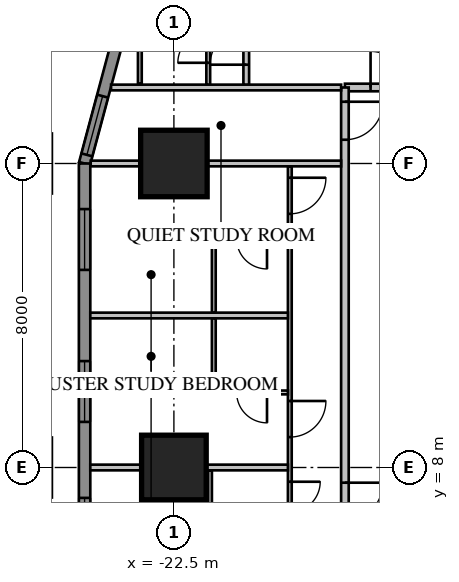
"""IFC4 building model, lengths in metres.
Left out: names, types, materials, properties, quantities, classifications, styles, units other than length and angle.
Written with IfcOpenShell. Run it as: python <this file> out.ifc"""

import sys

from ifc_helpers import new_model, si_unit, direction, frame, frame_2d, origin, origin_2d, place, context, subcontext, project, spatial, rectangle, extrude, element, fill, save


model = new_model("IFC4")
c1 = context("Model", 3, precision=1e-05, world=origin(), true_north=direction((0.0, 1.0)))
c2 = subcontext(c1, "Body", "Model", "MODEL_VIEW")
j1 = project(units=[si_unit("LENGTHUNIT", "METRE"), si_unit("PLANEANGLEUNIT", "RADIAN")], contexts=[c1])
p1 = place(None, origin())
s1 = spatial("IfcSite", under=j1, at=p1, CompositionType="ELEMENT")
p2 = place(p1, origin())
s2 = spatial("IfcBuilding", under=s1, at=p2, CompositionType="ELEMENT")
p3 = place(p2, frame((0.0, 0.0, 39.1)))
s3 = spatial("IfcBuildingStorey", under=s2, at=p3, CompositionType="ELEMENT", Elevation=39.1)
p4 = place(p3, frame((-22.5, 16.0, 0.0), z_axis=(0.0, 0.0, 1.0), x_axis=(1.0, 0.0, 0.0)))
e1 = element("IfcColumn", 1, at=p4, inside=s3, PredefinedType="COLUMN", context=c2, shape_type="SweptSolid", body=[
    extrude(rectangle(XDim=1.75, YDim=1.75, at=origin_2d()), origin(), (0.0, 0.0, 1.0), 3.85),
])
p5 = place(p3, frame((-22.5, 8.0, 0.0), z_axis=(0.0, 0.0, 1.0), x_axis=(1.0, 0.0, 0.0)))
e2 = element("IfcColumn", 2, at=p5, inside=s3, PredefinedType="COLUMN", context=c2, shape_type="SweptSolid", body=[
    extrude(rectangle(XDim=1.7, YDim=1.7, at=origin_2d()), origin(), (0.0, 0.0, 1.0), 3.85),
])
p6 = place(p3, frame((-23.664, 20.425, 0.0), z_axis=(0.0, 0.0, 1.0), x_axis=(-0.258839972501, -0.965920218567, 0.0)))
e3 = element("IfcWall", 3, at=p6, inside=s3, PredefinedType="SOLIDWALL", context=c2, shape_type="SweptSolid", body=[
    extrude(rectangle(XDim=4.581, YDim=0.3, at=frame_2d((2.291, 0.0))), origin(), (0.0, 0.0, 1.0), 3.65),
])
p7 = place(p6, frame((2.746, 0.0, 0.75)))
e4 = element("IfcOpeningElement", 4, at=p7, cuts=e3, PredefinedType="OPENING", context=c2, shape_type="SweptSolid", body=[
    extrude(rectangle(XDim=1.6, YDim=1.8, at=frame_2d((0.8, 0.9))), frame((0.0, 0.17, 0.0), z_axis=(0.0, -1.0, 0.0), x_axis=(1.0, 0.0, 0.0)), (0.0, 0.0, 1.0), 0.34),
])
p8 = place(p3, frame((-24.85, 16.0, 0.0), z_axis=(0.0, 0.0, 1.0), x_axis=(0.0, -1.0, 0.0)))
e5 = element("IfcWall", 5, at=p8, inside=s3, PredefinedType="SOLIDWALL", context=c2, shape_type="SweptSolid", body=[
    extrude(rectangle(XDim=32.0, YDim=0.3, at=frame_2d((16.0, 0.0))), origin(), (0.0, 0.0, 1.0), 3.65),
])
p9 = place(p8, frame((1.2, 0.0, 0.75)))
e6 = element("IfcOpeningElement", 6, at=p9, cuts=e5, PredefinedType="OPENING", context=c2, shape_type="SweptSolid", body=[
    extrude(rectangle(XDim=1.6, YDim=1.8, at=frame_2d((0.8, 0.9))), frame((0.0, 0.17, 0.0), z_axis=(0.0, -1.0, 0.0), x_axis=(1.0, 0.0, 0.0)), (0.0, 0.0, 1.0), 0.34),
])
p10 = place(p8, frame((5.2, 0.0, 0.75)))
e7 = element("IfcOpeningElement", 7, at=p10, cuts=e5, PredefinedType="OPENING", context=c2, shape_type="SweptSolid", body=[
    extrude(rectangle(XDim=1.6, YDim=1.8, at=frame_2d((0.8, 0.9))), frame((0.0, 0.17, 0.0), z_axis=(0.0, -1.0, 0.0), x_axis=(1.0, 0.0, 0.0)), (0.0, 0.0, 1.0), 0.34),
])
p11 = place(p8, frame((17.2, 0.0, 0.75)))
e8 = element("IfcOpeningElement", 8, at=p11, cuts=e5, PredefinedType="OPENING", context=c2, shape_type="SweptSolid", body=[
    extrude(rectangle(XDim=1.6, YDim=1.8, at=frame_2d((0.8, 0.9))), frame((0.0, 0.17, 0.0), z_axis=(0.0, -1.0, 0.0), x_axis=(1.0, 0.0, 0.0)), (0.0, 0.0, 1.0), 0.34),
])
p12 = place(p8, frame((21.2, 0.0, 0.75)))
e9 = element("IfcOpeningElement", 9, at=p12, cuts=e5, PredefinedType="OPENING", context=c2, shape_type="SweptSolid", body=[
    extrude(rectangle(XDim=1.6, YDim=1.8, at=frame_2d((0.8, 0.9))), frame((0.0, 0.17, 0.0), z_axis=(0.0, -1.0, 0.0), x_axis=(1.0, 0.0, 0.0)), (0.0, 0.0, 1.0), 0.34),
])
p13 = place(p8, frame((25.2, 0.0, 0.75)))
e10 = element("IfcOpeningElement", 10, at=p13, cuts=e5, PredefinedType="OPENING", context=c2, shape_type="SweptSolid", body=[
    extrude(rectangle(XDim=1.6, YDim=1.8, at=frame_2d((0.8, 0.9))), frame((0.0, 0.17, 0.0), z_axis=(0.0, -1.0, 0.0), x_axis=(1.0, 0.0, 0.0)), (0.0, 0.0, 1.0), 0.34),
])
p14 = place(p8, frame((29.2, 0.0, 0.75)))
e11 = element("IfcOpeningElement", 11, at=p14, cuts=e5, PredefinedType="OPENING", context=c2, shape_type="SweptSolid", body=[
    extrude(rectangle(XDim=1.6, YDim=1.8, at=frame_2d((0.8, 0.9))), frame((0.0, 0.17, 0.0), z_axis=(0.0, -1.0, 0.0), x_axis=(1.0, 0.0, 0.0)), (0.0, 0.0, 1.0), 0.34),
])
p15 = place(p8, frame((8.8, 0.0, 0.75)))
e12 = element("IfcOpeningElement", 12, at=p15, cuts=e5, PredefinedType="OPENING", context=c2, shape_type="SweptSolid", body=[
    extrude(rectangle(XDim=2.4, YDim=1.8, at=frame_2d((1.2, 0.9))), frame((0.0, 0.17, 0.0), z_axis=(0.0, -1.0, 0.0), x_axis=(1.0, 0.0, 0.0)), (0.0, 0.0, 1.0), 0.34),
])
p16 = place(p8, frame((13.812, 0.0, 0.0)))
e13 = element("IfcOpeningElement", 13, at=p16, cuts=e5, PredefinedType="OPENING", context=c2, shape_type="SweptSolid", body=[
    extrude(rectangle(XDim=1.0, YDim=2.4, at=frame_2d((0.5, 1.2))), frame((0.0, 0.17, 0.0), z_axis=(0.0, -1.0, 0.0), x_axis=(1.0, 0.0, 0.0)), (0.0, 0.0, 1.0), 0.34),
])
p17 = place(p3, frame((18.0, 18.0, 0.0), z_axis=(0.0, 0.0, 1.0), x_axis=(-1.0, 0.0, 0.0)))
e14 = element("IfcWall", 14, at=p17, inside=s3, PredefinedType="PARTITIONING", context=c2, shape_type="SweptSolid", body=[
    extrude(rectangle(XDim=36.0, YDim=0.2, at=frame_2d((18.0, 0.0))), origin(), (0.0, 0.0, 1.0), 3.65),
])
p18 = place(p17, frame((10.4, 0.0, 0.0)))
e15 = element("IfcOpeningElement", 15, at=p18, cuts=e14, PredefinedType="OPENING", context=c2, shape_type="SweptSolid", body=[
    extrude(rectangle(XDim=1.0, YDim=2.1, at=frame_2d((0.5, 1.05))), frame((0.0, 0.12, 0.0), z_axis=(0.0, -1.0, 0.0), x_axis=(1.0, 0.0, 0.0)), (0.0, 0.0, 1.0), 0.24),
])
p19 = place(p17, frame((0.375, 0.0, 0.0)))
e16 = element("IfcOpeningElement", 16, at=p19, cuts=e14, PredefinedType="OPENING", context=c2, shape_type="SweptSolid", body=[
    extrude(rectangle(XDim=1.0, YDim=2.1, at=frame_2d((0.5, 1.05))), frame((0.0, 0.12, 0.0), z_axis=(0.0, -1.0, 0.0), x_axis=(1.0, 0.0, 0.0)), (0.0, 0.0, 1.0), 0.24),
])
p20 = place(p17, frame((34.375, 0.0, 0.0)))
e17 = element("IfcOpeningElement", 17, at=p20, cuts=e14, PredefinedType="OPENING", context=c2, shape_type="SweptSolid", body=[
    extrude(rectangle(XDim=0.95, YDim=2.1, at=frame_2d((0.475, 1.05))), frame((0.0, 0.12, 0.0), z_axis=(0.0, -1.0, 0.0), x_axis=(1.0, 0.0, 0.0)), (0.0, 0.0, 1.0), 0.24),
])
p21 = place(p3, frame((-21.596, 18.065, 0.0), z_axis=(0.0, 0.0, 1.0), x_axis=(0.0, 1.0, 0.0)))
e18 = element("IfcWall", 18, at=p21, inside=s3, PredefinedType="PARTITIONING", context=c2, shape_type="SweptSolid", body=[
    extrude(rectangle(XDim=2.335, YDim=0.1, at=frame_2d((1.167, 0.0))), origin(), (0.0, 0.0, 1.0), 3.65),
])
p22 = place(p21, frame((0.585, 0.0, 0.0)))
e19 = element("IfcOpeningElement", 19, at=p22, cuts=e18, PredefinedType="OPENING", context=c2, shape_type="SweptSolid", body=[
    extrude(rectangle(XDim=0.8, YDim=2.1, at=frame_2d((0.4, 1.05))), frame((0.0, 0.07, 0.0), z_axis=(0.0, -1.0, 0.0), x_axis=(1.0, 0.0, 0.0)), (0.0, 0.0, 1.0), 0.14),
])
p23 = place(p3, frame((-23.396, 18.1, 0.0), z_axis=(0.0, 0.0, 1.0), x_axis=(0.0, 1.0, 0.0)))
e20 = element("IfcWall", 20, at=p23, inside=s3, PredefinedType="PARTITIONING", context=c2, shape_type="SweptSolid", body=[
    extrude(rectangle(XDim=2.3, YDim=0.1, at=frame_2d((1.15, 0.0))), origin(), (0.0, 0.0, 1.0), 3.65),
])
p24 = place(p3, frame((-20.596, 18.065, 0.0), z_axis=(0.0, 0.0, 1.0), x_axis=(0.0, 1.0, 0.0)))
e21 = element("IfcWall", 21, at=p24, inside=s3, PredefinedType="PARTITIONING", context=c2, shape_type="SweptSolid", body=[
    extrude(rectangle(XDim=5.209, YDim=0.15, at=frame_2d((2.604, 0.0))), origin(), (0.0, 0.0, 1.0), 3.65),
])
p25 = place(p24, frame((0.535, 0.0, 0.0)))
e22 = element("IfcOpeningElement", 22, at=p25, cuts=e21, PredefinedType="OPENING", context=c2, shape_type="SweptSolid", body=[
    extrude(rectangle(XDim=0.95, YDim=2.1, at=frame_2d((0.475, 1.05))), frame((0.0, 0.095, 0.0), z_axis=(0.0, -1.0, 0.0), x_axis=(1.0, 0.0, 0.0)), (0.0, 0.0, 1.0), 0.19),
])
p26 = place(p3, frame((-18.0, 18.0, 0.0), z_axis=(0.0, 0.0, 1.0), x_axis=(0.0, -1.0, 0.0)))
e23 = element("IfcWall", 23, at=p26, inside=s3, PredefinedType="PARTITIONING", context=c2, shape_type="SweptSolid", body=[
    extrude(rectangle(XDim=36.0, YDim=0.2, at=frame_2d((18.0, 0.0))), origin(), (0.0, 0.0, 1.0), 3.65),
])
p27 = place(p26, frame((10.4, 0.0, 0.0)))
e24 = element("IfcOpeningElement", 24, at=p27, cuts=e23, PredefinedType="OPENING", context=c2, shape_type="SweptSolid", body=[
    extrude(rectangle(XDim=1.0, YDim=2.1, at=frame_2d((0.5, 1.05))), frame((0.0, 0.12, 0.0), z_axis=(0.0, -1.0, 0.0), x_axis=(1.0, 0.0, 0.0)), (0.0, 0.0, 1.0), 0.24),
])
p28 = place(p26, frame((0.375, 0.0, 0.0)))
e25 = element("IfcOpeningElement", 25, at=p28, cuts=e23, PredefinedType="OPENING", context=c2, shape_type="SweptSolid", body=[
    extrude(rectangle(XDim=1.0, YDim=2.1, at=frame_2d((0.5, 1.05))), frame((0.0, 0.12, 0.0), z_axis=(0.0, -1.0, 0.0), x_axis=(1.0, 0.0, 0.0)), (0.0, 0.0, 1.0), 0.24),
])
p29 = place(p26, frame((34.375, 0.0, 0.0)))
e26 = element("IfcOpeningElement", 26, at=p29, cuts=e23, PredefinedType="OPENING", context=c2, shape_type="SweptSolid", body=[
    extrude(rectangle(XDim=0.95, YDim=2.1, at=frame_2d((0.475, 1.05))), frame((0.0, 0.12, 0.0), z_axis=(0.0, -1.0, 0.0), x_axis=(1.0, 0.0, 0.0)), (0.0, 0.0, 1.0), 0.24),
])
p30 = place(p3, frame((-19.45, 15.925, 0.0), z_axis=(0.0, 0.0, 1.0), x_axis=(0.0, -1.0, 0.0)))
e27 = element("IfcWall", 27, at=p30, inside=s3, PredefinedType="PARTITIONING", context=c2, shape_type="SweptSolid", body=[
    extrude(rectangle(XDim=31.85, YDim=0.1, at=frame_2d((15.925, 0.0))), origin(), (0.0, 0.0, 1.0), 3.65),
])
p31 = place(p30, frame((10.125, 0.0, 0.0)))
e28 = element("IfcOpeningElement", 28, at=p31, cuts=e27, PredefinedType="OPENING", context=c2, shape_type="SweptSolid", body=[
    extrude(rectangle(XDim=1.0, YDim=2.1, at=frame_2d((0.5, 1.05))), frame((0.0, 0.07, 0.0), z_axis=(0.0, -1.0, 0.0), x_axis=(1.0, 0.0, 0.0)), (0.0, 0.0, 1.0), 0.14),
])
p32 = place(p30, frame((8.3, 0.0, 0.0)))
e29 = element("IfcOpeningElement", 29, at=p32, cuts=e27, PredefinedType="OPENING", context=c2, shape_type="SweptSolid", body=[
    extrude(rectangle(XDim=0.8, YDim=2.1, at=frame_2d((0.4, 1.05))), frame((0.0, 0.07, 0.0), z_axis=(0.0, -1.0, 0.0), x_axis=(1.0, 0.0, 0.0)), (0.0, 0.0, 1.0), 0.14),
])
p33 = place(p30, frame((0.3, 0.0, 0.0)))
e30 = element("IfcOpeningElement", 30, at=p33, cuts=e27, PredefinedType="OPENING", context=c2, shape_type="SweptSolid", body=[
    extrude(rectangle(XDim=0.95, YDim=2.1, at=frame_2d((0.475, 1.05))), frame((0.0, 0.07, 0.0), z_axis=(0.0, -1.0, 0.0), x_axis=(1.0, 0.0, 0.0)), (0.0, 0.0, 1.0), 0.14),
])
p34 = place(p30, frame((6.175, 0.0, 0.0)))
e31 = element("IfcOpeningElement", 31, at=p34, cuts=e27, PredefinedType="OPENING", context=c2, shape_type="SweptSolid", body=[
    extrude(rectangle(XDim=0.95, YDim=2.1, at=frame_2d((0.475, 1.05))), frame((0.0, 0.07, 0.0), z_axis=(0.0, -1.0, 0.0), x_axis=(1.0, 0.0, 0.0)), (0.0, 0.0, 1.0), 0.14),
])
p35 = place(p30, frame((16.3, 0.0, 0.0)))
e32 = element("IfcOpeningElement", 32, at=p35, cuts=e27, PredefinedType="OPENING", context=c2, shape_type="SweptSolid", body=[
    extrude(rectangle(XDim=0.95, YDim=2.1, at=frame_2d((0.475, 1.05))), frame((0.0, 0.07, 0.0), z_axis=(0.0, -1.0, 0.0), x_axis=(1.0, 0.0, 0.0)), (0.0, 0.0, 1.0), 0.14),
])
p36 = place(p30, frame((22.175, 0.0, 0.0)))
e33 = element("IfcOpeningElement", 33, at=p36, cuts=e27, PredefinedType="OPENING", context=c2, shape_type="SweptSolid", body=[
    extrude(rectangle(XDim=0.95, YDim=2.1, at=frame_2d((0.475, 1.05))), frame((0.0, 0.07, 0.0), z_axis=(0.0, -1.0, 0.0), x_axis=(1.0, 0.0, 0.0)), (0.0, 0.0, 1.0), 0.14),
])
p37 = place(p30, frame((24.3, 0.0, 0.0)))
e34 = element("IfcOpeningElement", 34, at=p37, cuts=e27, PredefinedType="OPENING", context=c2, shape_type="SweptSolid", body=[
    extrude(rectangle(XDim=0.95, YDim=2.1, at=frame_2d((0.475, 1.05))), frame((0.0, 0.07, 0.0), z_axis=(0.0, -1.0, 0.0), x_axis=(1.0, 0.0, 0.0)), (0.0, 0.0, 1.0), 0.14),
])
p38 = place(p30, frame((30.175, 0.0, 0.0)))
e35 = element("IfcOpeningElement", 35, at=p38, cuts=e27, PredefinedType="OPENING", context=c2, shape_type="SweptSolid", body=[
    extrude(rectangle(XDim=0.95, YDim=2.1, at=frame_2d((0.475, 1.05))), frame((0.0, 0.07, 0.0), z_axis=(0.0, -1.0, 0.0), x_axis=(1.0, 0.0, 0.0)), (0.0, 0.0, 1.0), 0.14),
])
p39 = place(p3, frame((-21.55, 7.925, 0.0), z_axis=(0.0, 0.0, 1.0), x_axis=(0.0, -1.0, 0.0)))
e36 = element("IfcWall", 36, at=p39, inside=s3, PredefinedType="PARTITIONING", context=c2, shape_type="SweptSolid", body=[
    extrude(rectangle(XDim=1.7, YDim=0.1, at=frame_2d((0.85, 0.0))), origin(), (0.0, 0.0, 1.0), 3.65),
])
p40 = place(p3, frame((-18.1, 18.0, 0.0), z_axis=(0.0, 0.0, 1.0), x_axis=(-1.0, 0.0, 0.0)))
e37 = element("IfcWall", 37, at=p40, inside=s3, PredefinedType="PARTITIONING", context=c2, shape_type="SweptSolid", body=[
    extrude(rectangle(XDim=6.053, YDim=0.15, at=frame_2d((3.027, 0.0))), origin(), (0.0, 0.0, 1.0), 3.65),
])
p41 = place(p3, frame((-18.1, 16.0, 0.0), z_axis=(0.0, 0.0, 1.0), x_axis=(-1.0, 0.0, 0.0)))
e38 = element("IfcWall", 38, at=p41, inside=s3, PredefinedType="PARTITIONING", context=c2, shape_type="SweptSolid", body=[
    extrude(rectangle(XDim=6.589, YDim=0.15, at=frame_2d((3.295, 0.0))), origin(), (0.0, 0.0, 1.0), 3.65),
])
for number, where, z_axis, x_axis in (
    (39, (-19.5, 12.0, 0.0), (0.0, 0.0, 1.0), (-1.0, 0.0, 0.0)),
    (40, (-19.5, 8.0, 0.0), (0.0, 0.0, 1.0), (-1.0, 0.0, 0.0)),
):
    element("IfcWall", number, at=place(p3, frame(where, z_axis=z_axis, x_axis=x_axis)), inside=s3, PredefinedType="PARTITIONING", context=c2, shape_type="SweptSolid", body=[
        extrude(rectangle(XDim=5.2, YDim=0.15, at=frame_2d((2.6, 0.0))), origin(), (0.0, 0.0, 1.0), 3.65),
    ])
p42 = place(p3, frame((-19.5, 14.025, 0.0), z_axis=(0.0, 0.0, 1.0), x_axis=(-1.0, 0.0, 0.0)))
e41 = element("IfcWall", 41, at=p42, inside=s3, PredefinedType="PARTITIONING", context=c2, shape_type="SweptSolid", body=[
    extrude(rectangle(XDim=2.0, YDim=0.1, at=frame_2d((1.0, 0.0))), origin(), (0.0, 0.0, 1.0), 3.65),
])
p43 = place(p42, frame((0.55, 0.0, 0.0)))
e42 = element("IfcOpeningElement", 42, at=p43, cuts=e41, PredefinedType="OPENING", context=c2, shape_type="SweptSolid", body=[
    extrude(rectangle(XDim=0.8, YDim=2.1, at=frame_2d((0.4, 1.05))), frame((0.0, 0.07, 0.0), z_axis=(0.0, -1.0, 0.0), x_axis=(1.0, 0.0, 0.0)), (0.0, 0.0, 1.0), 0.14),
])
p44 = place(p3, frame((-21.45, 13.975, 0.0), z_axis=(0.0, 0.0, 1.0), x_axis=(0.0, -1.0, 0.0)))
e43 = element("IfcWall", 43, at=p44, inside=s3, PredefinedType="PARTITIONING", context=c2, shape_type="SweptSolid", body=[
    extrude(rectangle(XDim=1.9, YDim=0.1, at=frame_2d((0.95, 0.0))), origin(), (0.0, 0.0, 1.0), 3.65),
])
p45 = place(p3, frame((-19.5, 9.975, 0.0), z_axis=(0.0, 0.0, 1.0), x_axis=(-1.0, 0.0, 0.0)))
e44 = element("IfcWall", 44, at=p45, inside=s3, PredefinedType="PARTITIONING", context=c2, shape_type="SweptSolid", body=[
    extrude(rectangle(XDim=2.0, YDim=0.1, at=frame_2d((1.0, 0.0))), origin(), (0.0, 0.0, 1.0), 3.65),
])
p46 = place(p45, frame((0.55, 0.0, 0.0)))
e45 = element("IfcOpeningElement", 45, at=p46, cuts=e44, PredefinedType="OPENING", context=c2, shape_type="SweptSolid", body=[
    extrude(rectangle(XDim=0.8, YDim=2.1, at=frame_2d((0.4, 1.05))), frame((0.0, 0.07, 0.0), z_axis=(0.0, -1.0, 0.0), x_axis=(1.0, 0.0, 0.0)), (0.0, 0.0, 1.0), 0.14),
])
p47 = place(p3, frame((-21.45, 11.925, 0.0), z_axis=(0.0, 0.0, 1.0), x_axis=(0.0, -1.0, 0.0)))
e46 = element("IfcWall", 46, at=p47, inside=s3, PredefinedType="PARTITIONING", context=c2, shape_type="SweptSolid", body=[
    extrude(rectangle(XDim=1.9, YDim=0.1, at=frame_2d((0.95, 0.0))), origin(), (0.0, 0.0, 1.0), 3.65),
])
p48 = place(p7, origin())
e47 = element("IfcWindow", 47, at=p48, inside=s3, PartitioningType="SINGLE_PANEL", PredefinedType="WINDOW", context=c2, shape_type="SweptSolid", body=[
    extrude(rectangle(XDim=1.6, YDim=1.8, at=frame_2d((0.8, 0.9))), frame((0.0, 0.03, 0.0), z_axis=(0.0, -1.0, 0.0), x_axis=(1.0, 0.0, 0.0)), (0.0, 0.0, 1.0), 0.06),
])
fill(e4, e47)
p49 = place(p9, origin())
e48 = element("IfcWindow", 48, at=p49, inside=s3, PartitioningType="SINGLE_PANEL", PredefinedType="WINDOW", context=c2, shape_type="SweptSolid", body=[
    extrude(rectangle(XDim=1.6, YDim=1.8, at=frame_2d((0.8, 0.9))), frame((0.0, 0.03, 0.0), z_axis=(0.0, -1.0, 0.0), x_axis=(1.0, 0.0, 0.0)), (0.0, 0.0, 1.0), 0.06),
])
fill(e6, e48)
p50 = place(p10, origin())
e49 = element("IfcWindow", 49, at=p50, inside=s3, PartitioningType="SINGLE_PANEL", PredefinedType="WINDOW", context=c2, shape_type="SweptSolid", body=[
    extrude(rectangle(XDim=1.6, YDim=1.8, at=frame_2d((0.8, 0.9))), frame((0.0, 0.03, 0.0), z_axis=(0.0, -1.0, 0.0), x_axis=(1.0, 0.0, 0.0)), (0.0, 0.0, 1.0), 0.06),
])
fill(e7, e49)
p51 = place(p15, origin())
e50 = element("IfcWindow", 50, at=p51, inside=s3, PartitioningType="SINGLE_PANEL", PredefinedType="WINDOW", context=c2, shape_type="SweptSolid", body=[
    extrude(rectangle(XDim=2.4, YDim=1.8, at=frame_2d((1.2, 0.9))), frame((0.0, 0.03, 0.0), z_axis=(0.0, -1.0, 0.0), x_axis=(1.0, 0.0, 0.0)), (0.0, 0.0, 1.0), 0.06),
])
fill(e12, e50)
p52 = place(p20, origin())
e51 = element("IfcDoor", 51, at=p52, inside=s3, OperationType="SINGLE_SWING_RIGHT", PredefinedType="DOOR", context=c2, shape_type="SweptSolid", body=[
    extrude(rectangle(XDim=0.95, YDim=2.1, at=frame_2d((0.475, 1.05))), frame((0.0, 0.025, 0.0), z_axis=(0.0, -1.0, 0.0), x_axis=(1.0, 0.0, 0.0)), (0.0, 0.0, 1.0), 0.05),
])
fill(e17, e51)
p53 = place(p22, origin())
e52 = element("IfcDoor", 52, at=p53, inside=s3, OperationType="SINGLE_SWING_LEFT", PredefinedType="DOOR", context=c2, shape_type="SweptSolid", body=[
    extrude(rectangle(XDim=0.8, YDim=2.1, at=frame_2d((0.4, 1.05))), frame((0.0, 0.025, 0.0), z_axis=(0.0, -1.0, 0.0), x_axis=(1.0, 0.0, 0.0)), (0.0, 0.0, 1.0), 0.05),
])
fill(e19, e52)
p54 = place(p25, origin())
e53 = element("IfcDoor", 53, at=p54, inside=s3, OperationType="SINGLE_SWING_LEFT", PredefinedType="DOOR", context=c2, shape_type="SweptSolid", body=[
    extrude(rectangle(XDim=0.95, YDim=2.1, at=frame_2d((0.475, 1.05))), frame((0.0, 0.025, 0.0), z_axis=(0.0, -1.0, 0.0), x_axis=(1.0, 0.0, 0.0)), (0.0, 0.0, 1.0), 0.05),
])
fill(e22, e53)
p55 = place(p27, origin())
e54 = element("IfcDoor", 54, at=p55, inside=s3, OperationType="SINGLE_SWING_LEFT", PredefinedType="DOOR", context=c2, shape_type="SweptSolid", body=[
    extrude(rectangle(XDim=1.0, YDim=2.1, at=frame_2d((0.5, 1.05))), frame((0.0, 0.025, 0.0), z_axis=(0.0, -1.0, 0.0), x_axis=(1.0, 0.0, 0.0)), (0.0, 0.0, 1.0), 0.05),
])
fill(e24, e54)
p56 = place(p32, origin())
e55 = element("IfcDoor", 55, at=p56, inside=s3, OperationType="SINGLE_SWING_LEFT", PredefinedType="DOOR", context=c2, shape_type="SweptSolid", body=[
    extrude(rectangle(XDim=0.8, YDim=2.1, at=frame_2d((0.4, 1.05))), frame((0.0, 0.025, 0.0), z_axis=(0.0, -1.0, 0.0), x_axis=(1.0, 0.0, 0.0)), (0.0, 0.0, 1.0), 0.05),
])
fill(e29, e55)
p57 = place(p28, origin())
e56 = element("IfcDoor", 56, at=p57, inside=s3, OperationType="SINGLE_SWING_LEFT", PredefinedType="DOOR", context=c2, shape_type="SweptSolid", body=[
    extrude(rectangle(XDim=1.0, YDim=2.1, at=frame_2d((0.5, 1.05))), frame((0.0, 0.025, 0.0), z_axis=(0.0, -1.0, 0.0), x_axis=(1.0, 0.0, 0.0)), (0.0, 0.0, 1.0), 0.05),
])
fill(e25, e56)
p58 = place(p33, origin())
e57 = element("IfcDoor", 57, at=p58, inside=s3, OperationType="SINGLE_SWING_LEFT", PredefinedType="DOOR", context=c2, shape_type="SweptSolid", body=[
    extrude(rectangle(XDim=0.95, YDim=2.1, at=frame_2d((0.475, 1.05))), frame((0.0, 0.025, 0.0), z_axis=(0.0, -1.0, 0.0), x_axis=(1.0, 0.0, 0.0)), (0.0, 0.0, 1.0), 0.05),
])
fill(e30, e57)
p59 = place(p43, origin())
e58 = element("IfcDoor", 58, at=p59, inside=s3, OperationType="SINGLE_SWING_LEFT", PredefinedType="DOOR", context=c2, shape_type="SweptSolid", body=[
    extrude(rectangle(XDim=0.8, YDim=2.1, at=frame_2d((0.4, 1.05))), frame((0.0, 0.025, 0.0), z_axis=(0.0, -1.0, 0.0), x_axis=(1.0, 0.0, 0.0)), (0.0, 0.0, 1.0), 0.05),
])
fill(e42, e58)
p60 = place(p34, origin())
e59 = element("IfcDoor", 59, at=p60, inside=s3, OperationType="SINGLE_SWING_LEFT", PredefinedType="DOOR", context=c2, shape_type="SweptSolid", body=[
    extrude(rectangle(XDim=0.95, YDim=2.1, at=frame_2d((0.475, 1.05))), frame((0.0, 0.025, 0.0), z_axis=(0.0, -1.0, 0.0), x_axis=(1.0, 0.0, 0.0)), (0.0, 0.0, 1.0), 0.05),
])
fill(e31, e59)
p61 = place(p46, origin())
e60 = element("IfcDoor", 60, at=p61, inside=s3, OperationType="SINGLE_SWING_LEFT", PredefinedType="DOOR", context=c2, shape_type="SweptSolid", body=[
    extrude(rectangle(XDim=0.8, YDim=2.1, at=frame_2d((0.4, 1.05))), frame((0.0, 0.025, 0.0), z_axis=(0.0, -1.0, 0.0), x_axis=(1.0, 0.0, 0.0)), (0.0, 0.0, 1.0), 0.05),
])
fill(e45, e60)
save(model, sys.argv[1])
